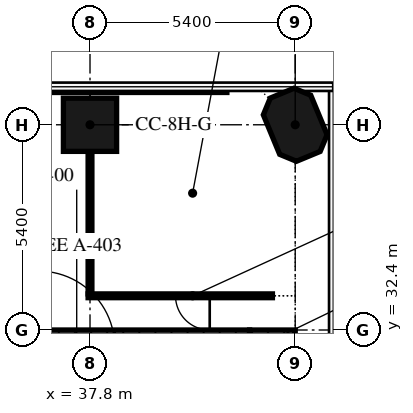
"""IFC4 building model, lengths in metres.
Left out: names, types, materials, properties, quantities, classifications, styles, units other than length and angle.
Written with IfcOpenShell. Run it as: python <this file> out.ifc"""

import sys

from ifc_helpers import new_model, si_unit, direction, frame, frame_2d, origin, origin_2d, place, context, subcontext, project, spatial, polyline, rectangle, outline, extrude, element, fill, save


model = new_model("IFC4")
c1 = context("Model", 3, precision=1e-05, world=origin(), true_north=direction((0.0, 1.0)))
c2 = subcontext(c1, "Body", "Model", "MODEL_VIEW")
j1 = project(units=[si_unit("LENGTHUNIT", "METRE"), si_unit("PLANEANGLEUNIT", "RADIAN")], contexts=[c1])
p1 = place(None, origin())
s1 = spatial("IfcSite", under=j1, at=p1, CompositionType="ELEMENT")
p2 = place(p1, origin())
s2 = spatial("IfcBuilding", under=s1, at=p2, CompositionType="ELEMENT")
p3 = place(p2, origin())
s3 = spatial("IfcBuildingStorey", under=s2, at=p3, CompositionType="ELEMENT", Elevation=0.0)
p4 = place(p3, frame((37.8, 37.8, 0.0), z_axis=(0.0, 0.0, 1.0), x_axis=(1.0, 0.0, 0.0)))
e1 = element("IfcColumn", 1, at=p4, inside=s3, PredefinedType="COLUMN", context=c2, shape_type="SweptSolid", body=[
    extrude(rectangle(XDim=1.4, YDim=1.4, at=origin_2d()), origin(), (0.0, 0.0, 1.0), 8.0),
])
p5 = place(p3, frame((43.2, 37.8, 0.0), z_axis=(0.0, 0.0, 1.0), x_axis=(-0.382683432365, 0.923879532511, 0.0)))
e2 = element("IfcColumn", 2, at=p5, inside=s3, PredefinedType="COLUMN", context=c2, shape_type="SweptSolid", body=[
    extrude(outline(polyline([(-0.562, -0.675), (0.562, -0.675), (0.9, -0.337), (0.9, 0.337), (0.562, 0.675), (-0.562, 0.675), (-0.9, 0.337), (-0.9, -0.337), (-0.562, -0.675)])), origin(), (0.0, 0.0, 1.0), 8.0),
])
p6 = place(p3, frame((30.9, 31.95, 0.0), z_axis=(0.0, 0.0, 1.0), x_axis=(1.0, 0.0, 0.0)))
e3 = element("IfcWall", 3, at=p6, inside=s3, PredefinedType="SOLIDWALL", context=c2, shape_type="SweptSolid", body=[
    extrude(rectangle(XDim=11.1, YDim=0.9, at=frame_2d((5.55, 0.0))), origin(), (0.0, 0.0, 1.0), 8.0),
])
p7 = place(p6, frame((5.55, 0.0, 0.0)))
e4 = element("IfcOpeningElement", 4, at=p7, cuts=e3, PredefinedType="OPENING", context=c2, shape_type="SweptSolid", body=[
    extrude(rectangle(XDim=2.0, YDim=2.4, at=frame_2d((1.0, 1.2))), frame((0.0, 0.45, 0.0), z_axis=(0.0, -1.0, 0.0), x_axis=(1.0, 0.0, 0.0)), (0.0, 0.0, 1.0), 0.9),
])
p8 = place(p6, frame((1.0, 0.0, 0.0)))
e5 = element("IfcOpeningElement", 5, at=p8, cuts=e3, PredefinedType="OPENING", context=c2, shape_type="SweptSolid", body=[
    extrude(rectangle(XDim=1.2, YDim=2.1, at=frame_2d((0.6, 1.05))), frame((0.0, 0.45, 0.0), z_axis=(0.0, -1.0, 0.0), x_axis=(1.0, 0.0, 0.0)), (0.0, 0.0, 1.0), 0.9),
])
p9 = place(p3, frame((42.6, 32.4, 0.0), z_axis=(0.0, 0.0, 1.0), x_axis=(0.0, -1.0, 0.0)))
e6 = element("IfcWall", 6, at=p9, inside=s3, PredefinedType="SOLIDWALL", context=c2, shape_type="SweptSolid", body=[
    extrude(rectangle(XDim=16.2, YDim=1.2, at=frame_2d((8.1, 0.0))), origin(), (0.0, 0.0, 1.0), 8.0),
])
p10 = place(p9, frame((9.45, 0.0, 0.0)))
e7 = element("IfcOpeningElement", 7, at=p10, cuts=e6, PredefinedType="OPENING", context=c2, shape_type="SweptSolid", body=[
    extrude(rectangle(XDim=1.2, YDim=2.1, at=frame_2d((0.6, 1.05))), frame((0.0, 0.6, 0.0), z_axis=(0.0, -1.0, 0.0), x_axis=(1.0, 0.0, 0.0)), (0.0, 0.0, 1.0), 1.2),
])
p11 = place(p3, frame((42.6, 33.3, 0.0), z_axis=(0.0, 0.0, 1.0), x_axis=(-1.0, 0.0, 0.0)))
e8 = element("IfcWall", 8, at=p11, inside=s3, PredefinedType="PARTITIONING", context=c2, shape_type="SweptSolid", body=[
    extrude(rectangle(XDim=4.85, YDim=0.1, at=frame_2d((2.425, 0.0))), origin(), (0.0, 0.0, 1.0), 8.0),
])
p12 = place(p11, frame((1.65, 0.0, 0.0)))
e9 = element("IfcOpeningElement", 9, at=p12, cuts=e8, PredefinedType="OPENING", context=c2, shape_type="SweptSolid", body=[
    extrude(rectangle(XDim=0.9, YDim=2.1, at=frame_2d((0.45, 1.05))), frame((0.0, 0.05, 0.0), z_axis=(0.0, -1.0, 0.0), x_axis=(1.0, 0.0, 0.0)), (0.0, 0.0, 1.0), 0.1),
])
p13 = place(p3, frame((37.8, 33.35, 0.0), z_axis=(0.0, 0.0, 1.0), x_axis=(0.0, 1.0, 0.0)))
e10 = element("IfcWall", 10, at=p13, inside=s3, PredefinedType="PARTITIONING", context=c2, shape_type="SweptSolid", body=[
    extrude(rectangle(XDim=3.649, YDim=0.1, at=frame_2d((1.825, 0.0))), origin(), (0.0, 0.0, 1.0), 8.0),
])
p14 = place(p3, frame((41.402, 38.7, 0.0), z_axis=(0.0, 0.0, 1.0), x_axis=(-1.0, 0.0, 0.0)))
e11 = element("IfcWall", 11, at=p14, inside=s3, PredefinedType="PARTITIONING", context=c2, shape_type="SweptSolid", body=[
    extrude(rectangle(XDim=14.402, YDim=0.1, at=frame_2d((7.201, 0.0))), origin(), (0.0, 0.0, 1.0), 8.0),
])
p15 = place(p12, origin())
e12 = element("IfcDoor", 12, at=p15, inside=s3, OperationType="SINGLE_SWING_RIGHT", PredefinedType="DOOR", context=c2, shape_type="SweptSolid", body=[
    extrude(rectangle(XDim=0.9, YDim=2.1, at=frame_2d((0.45, 1.05))), frame((0.0, 0.025, 0.0), z_axis=(0.0, -1.0, 0.0), x_axis=(1.0, 0.0, 0.0)), (0.0, 0.0, 1.0), 0.05),
])
fill(e9, e12)
save(model, sys.argv[1])
